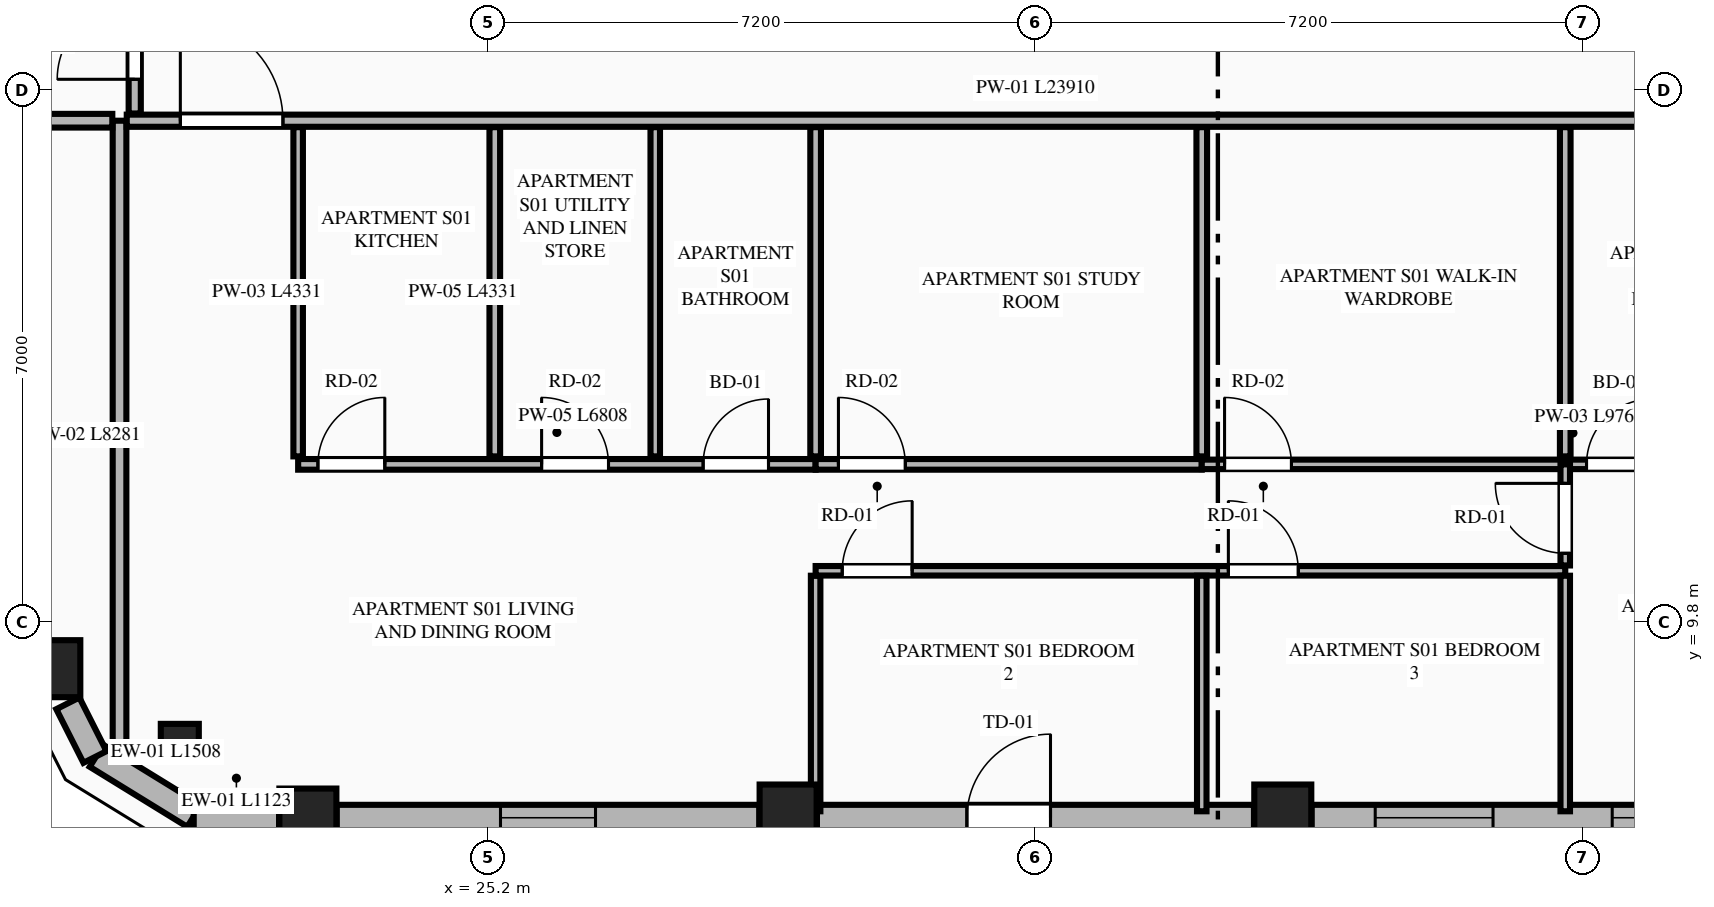
"""IFC4 building model, lengths in metres.
Left out: names, types, materials, properties, quantities, classifications, styles, units other than length and angle.
Written with IfcOpenShell. Run it as: python <this file> out.ifc"""

import sys

from ifc_helpers import new_model, si_unit, direction, frame, frame_2d, origin, origin_2d, place, context, subcontext, project, spatial, rectangle, extrude, element, fill, save


model = new_model("IFC4")
c1 = context("Model", 3, precision=1e-05, world=origin(), true_north=direction((0.0, 1.0)))
c2 = subcontext(c1, "Body", "Model", "MODEL_VIEW")
j1 = project(units=[si_unit("LENGTHUNIT", "METRE"), si_unit("PLANEANGLEUNIT", "RADIAN")], contexts=[c1])
p1 = place(None, origin())
s1 = spatial("IfcSite", under=j1, at=p1, CompositionType="ELEMENT")
p2 = place(p1, origin())
s2 = spatial("IfcBuilding", under=s1, at=p2, CompositionType="ELEMENT")
p3 = place(p2, frame((0.0, 0.0, 252.55)))
s3 = spatial("IfcBuildingStorey", under=s2, at=p3, CompositionType="ELEMENT", Elevation=252.55)
for number, where, z_axis, x_axis in (
    (1, (22.828, 7.239, 0.0), (0.0, 0.0, 1.0), (1.0, 0.0, 0.0)),
    (2, (29.146, 7.292, 0.0), (0.0, 0.0, 1.0), (1.0, 0.0, 0.0)),
    (3, (35.654, 7.292, 0.0), (0.0, 0.0, 1.0), (1.0, 0.0, 0.0)),
    (4, (19.459, 9.191, 0.0), (0.0, 0.0, 1.0), (1.0, 0.0, 0.0)),
):
    element("IfcColumn", number, at=place(p3, frame(where, z_axis=z_axis, x_axis=x_axis)), inside=s3, PredefinedType="COLUMN", context=c2, shape_type="SweptSolid", body=[
        extrude(rectangle(XDim=0.75, YDim=0.75, at=origin_2d()), origin(), (0.0, 0.0, 1.0), 3.65),
    ])
p4 = place(p3, frame((21.143, 8.215, 0.0), z_axis=(0.0, 0.0, 1.0), x_axis=(0.865256437757, -0.501329529272, 0.0)))
e5 = element("IfcColumn", 5, at=p4, inside=s3, PredefinedType="PILASTER", context=c2, shape_type="SweptSolid", body=[
    extrude(rectangle(XDim=0.5, YDim=0.35, at=origin_2d()), origin(), (0.0, 0.0, 1.0), 3.65),
])
p5 = place(p3, frame((20.047, 8.045, 0.0), z_axis=(0.0, 0.0, 1.0), x_axis=(0.851680557619, -0.52406128246, 0.0)))
e6 = element("IfcWall", 6, at=p5, inside=s3, PredefinedType="STANDARD", context=c2, shape_type="SweptSolid", body=[
    extrude(rectangle(XDim=1.508, YDim=0.34, at=frame_2d((0.754, 0.0))), origin(), (0.0, 0.0, 1.0), 3.45),
])
p6 = place(p3, frame((21.326, 7.23, 0.0), z_axis=(0.0, 0.0, 1.0), x_axis=(1.0, 0.0, 0.0)))
e7 = element("IfcWall", 7, at=p6, inside=s3, PredefinedType="STANDARD", context=c2, shape_type="SweptSolid", body=[
    extrude(rectangle(XDim=1.123, YDim=0.34, at=frame_2d((0.562, 0.0))), origin(), (0.0, 0.0, 1.0), 3.45),
])
p7 = place(p3, frame((23.207, 7.23, 0.0), z_axis=(0.0, 0.0, 1.0), x_axis=(1.0, 0.0, 0.0)))
e8 = element("IfcWall", 8, at=p7, inside=s3, PredefinedType="STANDARD", context=c2, shape_type="SweptSolid", body=[
    extrude(rectangle(XDim=5.56, YDim=0.34, at=frame_2d((2.78, 0.0))), origin(), (0.0, 0.0, 1.0), 2.983),
])
p8 = place(p7, frame((2.155, 0.0, 0.75)))
e9 = element("IfcOpeningElement", 9, at=p8, cuts=e8, PredefinedType="OPENING", context=c2, shape_type="SweptSolid", body=[
    extrude(rectangle(XDim=1.25, YDim=1.95, at=frame_2d((0.625, 0.975))), frame((0.0, 0.18, 0.0), z_axis=(0.0, -1.0, 0.0), x_axis=(1.0, 0.0, 0.0)), (0.0, 0.0, 1.0), 0.36),
])
p9 = place(p3, frame((29.525, 7.23, 0.0), z_axis=(0.0, 0.0, 1.0), x_axis=(1.0, 0.0, 0.0)))
e10 = element("IfcWall", 10, at=p9, inside=s3, PredefinedType="STANDARD", context=c2, shape_type="SweptSolid", body=[
    extrude(rectangle(XDim=5.75, YDim=0.34, at=frame_2d((2.875, 0.0))), origin(), (0.0, 0.0, 1.0), 2.983),
])
p10 = place(p9, frame((1.973, 0.0, 0.0)))
e11 = element("IfcOpeningElement", 11, at=p10, cuts=e10, PredefinedType="OPENING", context=c2, shape_type="SweptSolid", body=[
    extrude(rectangle(XDim=1.1, YDim=2.25, at=frame_2d((0.55, 1.125))), frame((0.0, 0.18, 0.0), z_axis=(0.0, -1.0, 0.0), x_axis=(1.0, 0.0, 0.0)), (0.0, 0.0, 1.0), 0.36),
])
p11 = place(p3, frame((36.033, 7.23, 0.0), z_axis=(0.0, 0.0, 1.0), x_axis=(1.0, 0.0, 0.0)))
e12 = element("IfcWall", 12, at=p11, inside=s3, PredefinedType="STANDARD", context=c2, shape_type="SweptSolid", body=[
    extrude(rectangle(XDim=5.56, YDim=0.34, at=frame_2d((2.78, 0.0))), origin(), (0.0, 0.0, 1.0), 2.983),
])
p12 = place(p11, frame((0.837, 0.0, 0.75)))
e13 = element("IfcOpeningElement", 13, at=p12, cuts=e12, PredefinedType="OPENING", context=c2, shape_type="SweptSolid", body=[
    extrude(rectangle(XDim=1.55, YDim=2.05, at=frame_2d((0.775, 1.025))), frame((0.0, 0.18, 0.0), z_axis=(0.0, -1.0, 0.0), x_axis=(1.0, 0.0, 0.0)), (0.0, 0.0, 1.0), 0.36),
])
p13 = place(p11, frame((3.955, 0.0, 0.75)))
e14 = element("IfcOpeningElement", 14, at=p13, cuts=e12, PredefinedType="OPENING", context=c2, shape_type="SweptSolid", body=[
    extrude(rectangle(XDim=1.1, YDim=2.0, at=frame_2d((0.55, 1.0))), frame((0.0, 0.18, 0.0), z_axis=(0.0, -1.0, 0.0), x_axis=(1.0, 0.0, 0.0)), (0.0, 0.0, 1.0), 0.36),
])
p14 = place(p3, frame((19.67, 8.735, 0.0), z_axis=(0.0, 0.0, 1.0), x_axis=(0.451404919072, -0.89231922485, 0.0)))
e15 = element("IfcWall", 15, at=p14, inside=s3, PredefinedType="STANDARD", context=c2, shape_type="SweptSolid", body=[
    extrude(rectangle(XDim=0.791, YDim=0.34, at=frame_2d((0.396, 0.0))), origin(), (0.0, 0.0, 1.0), 3.45),
])
p15 = place(p3, frame((20.35, 8.119, 0.0), z_axis=(0.0, 0.0, 1.0), x_axis=(0.0, 1.0, 0.0)))
e16 = element("IfcWall", 16, at=p15, inside=s3, PredefinedType="PARTITIONING", context=c2, shape_type="SweptSolid", body=[
    extrude(rectangle(XDim=8.281, YDim=0.18, at=frame_2d((4.141, 0.0))), origin(), (0.0, 0.0, 1.0), 3.45),
])
p16 = place(p3, frame((20.445, 16.4, 0.0), z_axis=(0.0, 0.0, 1.0), x_axis=(1.0, 0.0, 0.0)))
e17 = element("IfcWall", 17, at=p16, inside=s3, PredefinedType="PARTITIONING", context=c2, shape_type="SweptSolid", body=[
    extrude(rectangle(XDim=23.91, YDim=0.16, at=frame_2d((11.955, 0.0))), origin(), (0.0, 0.0, 1.0), 3.45),
])
p17 = place(p16, frame((0.705, 0.0, 0.0)))
e18 = element("IfcOpeningElement", 18, at=p17, cuts=e17, PredefinedType="OPENING", context=c2, shape_type="SweptSolid", body=[
    extrude(rectangle(XDim=1.35, YDim=2.35, at=frame_2d((0.675, 1.175))), frame((0.0, 0.09, 0.0), z_axis=(0.0, -1.0, 0.0), x_axis=(1.0, 0.0, 0.0)), (0.0, 0.0, 1.0), 0.18),
])
p18 = place(p3, frame((22.7, 11.984, 0.0), z_axis=(0.0, 0.0, 1.0), x_axis=(0.0, 1.0, 0.0)))
e19 = element("IfcWall", 19, at=p18, inside=s3, PredefinedType="PARTITIONING", context=c2, shape_type="SweptSolid", body=[
    extrude(rectangle(XDim=4.331, YDim=0.125, at=frame_2d((2.166, 0.0))), origin(), (0.0, 0.0, 1.0), 2.907),
])
p19 = place(p3, frame((22.7, 11.879, 0.0), z_axis=(0.0, 0.0, 1.0), x_axis=(1.0, 0.0, 0.0)))
e20 = element("IfcWall", 20, at=p19, inside=s3, PredefinedType="PLUMBINGWALL", context=c2, shape_type="SweptSolid", body=[
    extrude(rectangle(XDim=6.808, YDim=0.14, at=frame_2d((3.404, 0.0))), origin(), (0.0, 0.0, 1.0), 3.45),
])
p20 = place(p19, frame((5.328, 0.0, 0.0)))
e21 = element("IfcOpeningElement", 21, at=p20, cuts=e20, PredefinedType="OPENING", context=c2, shape_type="SweptSolid", body=[
    extrude(rectangle(XDim=0.86, YDim=2.1, at=frame_2d((0.43, 1.05))), frame((0.0, 0.08, 0.0), z_axis=(0.0, -1.0, 0.0), x_axis=(1.0, 0.0, 0.0)), (0.0, 0.0, 1.0), 0.16),
])
p21 = place(p19, frame((0.26, 0.0, 0.0)))
e22 = element("IfcOpeningElement", 22, at=p21, cuts=e20, PredefinedType="OPENING", context=c2, shape_type="SweptSolid", body=[
    extrude(rectangle(XDim=0.88, YDim=2.15, at=frame_2d((0.44, 1.075))), frame((0.0, 0.08, 0.0), z_axis=(0.0, -1.0, 0.0), x_axis=(1.0, 0.0, 0.0)), (0.0, 0.0, 1.0), 0.16),
])
p22 = place(p19, frame((3.203, 0.0, 0.0)))
e23 = element("IfcOpeningElement", 23, at=p22, cuts=e20, PredefinedType="OPENING", context=c2, shape_type="SweptSolid", body=[
    extrude(rectangle(XDim=0.88, YDim=2.15, at=frame_2d((0.44, 1.075))), frame((0.0, 0.08, 0.0), z_axis=(0.0, -1.0, 0.0), x_axis=(1.0, 0.0, 0.0)), (0.0, 0.0, 1.0), 0.16),
])
p23 = place(p3, frame((29.508, 11.879, 0.0), z_axis=(0.0, 0.0, 1.0), x_axis=(1.0, 0.0, 0.0)))
e24 = element("IfcWall", 24, at=p23, inside=s3, PredefinedType="PLUMBINGWALL", context=c2, shape_type="SweptSolid", body=[
    extrude(rectangle(XDim=5.08, YDim=0.14, at=frame_2d((2.54, 0.0))), origin(), (0.0, 0.0, 1.0), 3.45),
])
p24 = place(p23, frame((0.3, 0.0, 0.0)))
e25 = element("IfcOpeningElement", 25, at=p24, cuts=e24, PredefinedType="OPENING", context=c2, shape_type="SweptSolid", body=[
    extrude(rectangle(XDim=0.88, YDim=2.15, at=frame_2d((0.44, 1.075))), frame((0.0, 0.08, 0.0), z_axis=(0.0, -1.0, 0.0), x_axis=(1.0, 0.0, 0.0)), (0.0, 0.0, 1.0), 0.16),
])
p25 = place(p3, frame((34.588, 11.879, 0.0), z_axis=(0.0, 0.0, 1.0), x_axis=(1.0, 0.0, 0.0)))
e26 = element("IfcWall", 26, at=p25, inside=s3, PredefinedType="PARTITIONING", context=c2, shape_type="SweptSolid", body=[
    extrude(rectangle(XDim=9.767, YDim=0.125, at=frame_2d((4.884, 0.0))), origin(), (0.0, 0.0, 1.0), 3.45),
])
p26 = place(p25, frame((5.062, 0.0, 0.0)))
e27 = element("IfcOpeningElement", 27, at=p26, cuts=e26, PredefinedType="OPENING", context=c2, shape_type="SweptSolid", body=[
    extrude(rectangle(XDim=0.86, YDim=2.1, at=frame_2d((0.43, 1.05))), frame((0.0, 0.073, 0.0), z_axis=(0.0, -1.0, 0.0), x_axis=(1.0, 0.0, 0.0)), (0.0, 0.0, 1.0), 0.145),
])
p27 = place(p25, frame((8.226, 0.0, 0.0)))
e28 = element("IfcOpeningElement", 28, at=p27, cuts=e26, PredefinedType="OPENING", context=c2, shape_type="SweptSolid", body=[
    extrude(rectangle(XDim=0.88, YDim=2.15, at=frame_2d((0.44, 1.075))), frame((0.0, 0.073, 0.0), z_axis=(0.0, -1.0, 0.0), x_axis=(1.0, 0.0, 0.0)), (0.0, 0.0, 1.0), 0.145),
])
p28 = place(p25, frame((0.3, 0.0, 0.0)))
e29 = element("IfcOpeningElement", 29, at=p28, cuts=e26, PredefinedType="OPENING", context=c2, shape_type="SweptSolid", body=[
    extrude(rectangle(XDim=0.88, YDim=2.15, at=frame_2d((0.44, 1.075))), frame((0.0, 0.073, 0.0), z_axis=(0.0, -1.0, 0.0), x_axis=(1.0, 0.0, 0.0)), (0.0, 0.0, 1.0), 0.145),
])
p29 = place(p3, frame((25.287, 11.984, 0.0), z_axis=(0.0, 0.0, 1.0), x_axis=(0.0, 1.0, 0.0)))
e30 = element("IfcWall", 30, at=p29, inside=s3, PredefinedType="PLUMBINGWALL", context=c2, shape_type="SweptSolid", body=[
    extrude(rectangle(XDim=4.331, YDim=0.14, at=frame_2d((2.166, 0.0))), origin(), (0.0, 0.0, 1.0), 3.45),
])
p30 = place(p3, frame((27.398, 11.984, 0.0), z_axis=(0.0, 0.0, 1.0), x_axis=(0.0, 1.0, 0.0)))
e31 = element("IfcWall", 31, at=p30, inside=s3, PredefinedType="PARTITIONING", context=c2, shape_type="SweptSolid", body=[
    extrude(rectangle(XDim=4.331, YDim=0.125, at=frame_2d((2.166, 0.0))), origin(), (0.0, 0.0, 1.0), 3.45),
])
p31 = place(p3, frame((29.508, 7.315, 0.0), z_axis=(0.0, 0.0, 1.0), x_axis=(0.0, 1.0, 0.0)))
e32 = element("IfcWall", 32, at=p31, inside=s3, PredefinedType="PARTITIONING", context=c2, shape_type="SweptSolid", body=[
    extrude(rectangle(XDim=3.099, YDim=0.125, at=frame_2d((1.55, 0.0))), origin(), (0.0, 0.0, 1.0), 3.45),
])
p32 = place(p3, frame((29.508, 10.479, 0.0), z_axis=(0.0, 0.0, 1.0), x_axis=(1.0, 0.0, 0.0)))
e33 = element("IfcWall", 33, at=p32, inside=s3, PredefinedType="PARTITIONING", context=c2, shape_type="SweptSolid", body=[
    extrude(rectangle(XDim=9.862, YDim=0.125, at=frame_2d((4.931, 0.0))), origin(), (0.0, 0.0, 1.0), 3.45),
])
p33 = place(p32, frame((0.35, 0.0, 0.0)))
e34 = element("IfcOpeningElement", 34, at=p33, cuts=e33, PredefinedType="OPENING", context=c2, shape_type="SweptSolid", body=[
    extrude(rectangle(XDim=0.92, YDim=2.15, at=frame_2d((0.46, 1.075))), frame((0.0, 0.073, 0.0), z_axis=(0.0, -1.0, 0.0), x_axis=(1.0, 0.0, 0.0)), (0.0, 0.0, 1.0), 0.145),
])
p34 = place(p32, frame((5.43, 0.0, 0.0)))
e35 = element("IfcOpeningElement", 35, at=p34, cuts=e33, PredefinedType="OPENING", context=c2, shape_type="SweptSolid", body=[
    extrude(rectangle(XDim=0.92, YDim=2.15, at=frame_2d((0.46, 1.075))), frame((0.0, 0.073, 0.0), z_axis=(0.0, -1.0, 0.0), x_axis=(1.0, 0.0, 0.0)), (0.0, 0.0, 1.0), 0.145),
])
p35 = place(p3, frame((39.37, 10.549, 0.0), z_axis=(0.0, 0.0, 1.0), x_axis=(0.0, 1.0, 0.0)))
e36 = element("IfcWall", 36, at=p35, inside=s3, PredefinedType="PARTITIONING", context=c2, shape_type="SweptSolid", body=[
    extrude(rectangle(XDim=1.33, YDim=0.125, at=frame_2d((0.665, 0.0))), origin(), (0.0, 0.0, 1.0), 3.45),
])
p36 = place(p35, frame((0.16, 0.0, 0.0)))
e37 = element("IfcOpeningElement", 37, at=p36, cuts=e36, PredefinedType="OPENING", context=c2, shape_type="SweptSolid", body=[
    extrude(rectangle(XDim=0.92, YDim=2.15, at=frame_2d((0.46, 1.075))), frame((0.0, 0.073, 0.0), z_axis=(0.0, -1.0, 0.0), x_axis=(1.0, 0.0, 0.0)), (0.0, 0.0, 1.0), 0.145),
])
for number, where, z_axis, x_axis in (
    (38, (29.508, 11.984, 0.0), (0.0, 0.0, 1.0), (0.0, 1.0, 0.0)),
    (39, (34.588, 11.984, 0.0), (0.0, 0.0, 1.0), (0.0, 1.0, 0.0)),
):
    element("IfcWall", number, at=place(p3, frame(where, z_axis=z_axis, x_axis=x_axis)), inside=s3, PredefinedType="PLUMBINGWALL", context=c2, shape_type="SweptSolid", body=[
        extrude(rectangle(XDim=4.331, YDim=0.14, at=frame_2d((2.166, 0.0))), origin(), (0.0, 0.0, 1.0), 3.45),
    ])
for number, where, z_axis, x_axis in (
    (40, (34.588, 7.315, 0.0), (0.0, 0.0, 1.0), (0.0, 1.0, 0.0)),
    (41, (39.37, 7.315, 0.0), (0.0, 0.0, 1.0), (0.0, 1.0, 0.0)),
):
    element("IfcWall", number, at=place(p3, frame(where, z_axis=z_axis, x_axis=x_axis)), inside=s3, PredefinedType="PARTITIONING", context=c2, shape_type="SweptSolid", body=[
        extrude(rectangle(XDim=3.099, YDim=0.125, at=frame_2d((1.55, 0.0))), origin(), (0.0, 0.0, 1.0), 3.45),
    ])
p37 = place(p3, frame((39.37, 11.984, 0.0), z_axis=(0.0, 0.0, 1.0), x_axis=(0.0, 1.0, 0.0)))
e42 = element("IfcWall", 42, at=p37, inside=s3, PredefinedType="PLUMBINGWALL", context=c2, shape_type="SweptSolid", body=[
    extrude(rectangle(XDim=4.331, YDim=0.14, at=frame_2d((2.166, 0.0))), origin(), (0.0, 0.0, 1.0), 3.45),
])
p38 = place(p3, frame((16.034, 16.4, 0.0), z_axis=(0.0, 0.0, 1.0), x_axis=(1.0, 0.0, 0.0)))
e43 = element("IfcWall", 43, at=p38, inside=s3, PredefinedType="PARTITIONING", context=c2, shape_type="SweptSolid", body=[
    extrude(rectangle(XDim=4.221, YDim=0.18, at=frame_2d((2.11, 0.0))), origin(), (0.0, 0.0, 1.0), 3.45),
])
p39 = place(p3, frame((20.55, 16.495, 0.0), z_axis=(0.0, 0.0, 1.0), x_axis=(0.0, 1.0, 0.0)))
e44 = element("IfcWall", 44, at=p39, inside=s3, PredefinedType="PARTITIONING", context=c2, shape_type="SweptSolid", body=[
    extrude(rectangle(XDim=18.41, YDim=0.16, at=frame_2d((9.205, 0.0))), origin(), (0.0, 0.0, 1.0), 3.137),
])
p40 = place(p39, frame((0.45, 0.0, 0.0)))
e45 = element("IfcOpeningElement", 45, at=p40, cuts=e44, PredefinedType="OPENING", context=c2, shape_type="SweptSolid", body=[
    extrude(rectangle(XDim=1.02, YDim=2.25, at=frame_2d((0.51, 1.125))), frame((0.0, 0.09, 0.0), z_axis=(0.0, -1.0, 0.0), x_axis=(1.0, 0.0, 0.0)), (0.0, 0.0, 1.0), 0.18),
])
p41 = place(p8, origin())
e46 = element("IfcWindow", 46, at=p41, inside=s3, PartitioningType="SINGLE_PANEL", PredefinedType="WINDOW", context=c2, shape_type="SweptSolid", body=[
    extrude(rectangle(XDim=1.25, YDim=1.95, at=frame_2d((0.625, 0.975))), frame((0.0, 0.03, 0.0), z_axis=(0.0, -1.0, 0.0), x_axis=(1.0, 0.0, 0.0)), (0.0, 0.0, 1.0), 0.06),
])
fill(e9, e46)
p42 = place(p10, origin())
e47 = element("IfcDoor", 47, at=p42, inside=s3, OperationType="SINGLE_SWING_RIGHT", PredefinedType="DOOR", context=c2, shape_type="SweptSolid", body=[
    extrude(rectangle(XDim=1.1, YDim=2.25, at=frame_2d((0.55, 1.125))), frame((0.0, 0.025, 0.0), z_axis=(0.0, -1.0, 0.0), x_axis=(1.0, 0.0, 0.0)), (0.0, 0.0, 1.0), 0.05),
])
fill(e11, e47)
p43 = place(p12, origin())
e48 = element("IfcWindow", 48, at=p43, inside=s3, PartitioningType="SINGLE_PANEL", PredefinedType="WINDOW", context=c2, shape_type="SweptSolid", body=[
    extrude(rectangle(XDim=1.55, YDim=2.05, at=frame_2d((0.775, 1.025))), frame((0.0, 0.03, 0.0), z_axis=(0.0, -1.0, 0.0), x_axis=(1.0, 0.0, 0.0)), (0.0, 0.0, 1.0), 0.06),
])
fill(e13, e48)
p44 = place(p20, origin())
e49 = element("IfcDoor", 49, at=p44, inside=s3, OperationType="SINGLE_SWING_RIGHT", PredefinedType="DOOR", context=c2, shape_type="SweptSolid", body=[
    extrude(rectangle(XDim=0.86, YDim=2.1, at=frame_2d((0.43, 1.05))), frame((0.0, 0.025, 0.0), z_axis=(0.0, -1.0, 0.0), x_axis=(1.0, 0.0, 0.0)), (0.0, 0.0, 1.0), 0.05),
])
fill(e21, e49)
p45 = place(p26, origin())
e50 = element("IfcDoor", 50, at=p45, inside=s3, OperationType="SINGLE_SWING_RIGHT", PredefinedType="DOOR", context=c2, shape_type="SweptSolid", body=[
    extrude(rectangle(XDim=0.86, YDim=2.1, at=frame_2d((0.43, 1.05))), frame((0.0, 0.025, 0.0), z_axis=(0.0, -1.0, 0.0), x_axis=(1.0, 0.0, 0.0)), (0.0, 0.0, 1.0), 0.05),
])
fill(e27, e50)
p46 = place(p17, origin())
e51 = element("IfcDoor", 51, at=p46, inside=s3, OperationType="SINGLE_SWING_LEFT", PredefinedType="DOOR", context=c2, shape_type="SweptSolid", body=[
    extrude(rectangle(XDim=1.35, YDim=2.35, at=frame_2d((0.675, 1.175))), frame((0.0, 0.025, 0.0), z_axis=(0.0, -1.0, 0.0), x_axis=(1.0, 0.0, 0.0)), (0.0, 0.0, 1.0), 0.05),
])
fill(e18, e51)
p47 = place(p21, origin())
e52 = element("IfcDoor", 52, at=p47, inside=s3, OperationType="SINGLE_SWING_RIGHT", PredefinedType="DOOR", context=c2, shape_type="SweptSolid", body=[
    extrude(rectangle(XDim=0.88, YDim=2.15, at=frame_2d((0.44, 1.075))), frame((0.0, 0.025, 0.0), z_axis=(0.0, -1.0, 0.0), x_axis=(1.0, 0.0, 0.0)), (0.0, 0.0, 1.0), 0.05),
])
fill(e22, e52)
p48 = place(p22, origin())
e53 = element("IfcDoor", 53, at=p48, inside=s3, OperationType="SINGLE_SWING_LEFT", PredefinedType="DOOR", context=c2, shape_type="SweptSolid", body=[
    extrude(rectangle(XDim=0.88, YDim=2.15, at=frame_2d((0.44, 1.075))), frame((0.0, 0.025, 0.0), z_axis=(0.0, -1.0, 0.0), x_axis=(1.0, 0.0, 0.0)), (0.0, 0.0, 1.0), 0.05),
])
fill(e23, e53)
p49 = place(p24, origin())
e54 = element("IfcDoor", 54, at=p49, inside=s3, OperationType="SINGLE_SWING_LEFT", PredefinedType="DOOR", context=c2, shape_type="SweptSolid", body=[
    extrude(rectangle(XDim=0.88, YDim=2.15, at=frame_2d((0.44, 1.075))), frame((0.0, 0.025, 0.0), z_axis=(0.0, -1.0, 0.0), x_axis=(1.0, 0.0, 0.0)), (0.0, 0.0, 1.0), 0.05),
])
fill(e25, e54)
p50 = place(p33, origin())
e55 = element("IfcDoor", 55, at=p50, inside=s3, OperationType="SINGLE_SWING_RIGHT", PredefinedType="DOOR", context=c2, shape_type="SweptSolid", body=[
    extrude(rectangle(XDim=0.92, YDim=2.15, at=frame_2d((0.46, 1.075))), frame((0.0, 0.025, 0.0), z_axis=(0.0, -1.0, 0.0), x_axis=(1.0, 0.0, 0.0)), (0.0, 0.0, 1.0), 0.05),
])
fill(e34, e55)
p51 = place(p34, origin())
e56 = element("IfcDoor", 56, at=p51, inside=s3, OperationType="SINGLE_SWING_LEFT", PredefinedType="DOOR", context=c2, shape_type="SweptSolid", body=[
    extrude(rectangle(XDim=0.92, YDim=2.15, at=frame_2d((0.46, 1.075))), frame((0.0, 0.025, 0.0), z_axis=(0.0, -1.0, 0.0), x_axis=(1.0, 0.0, 0.0)), (0.0, 0.0, 1.0), 0.05),
])
fill(e35, e56)
p52 = place(p36, origin())
e57 = element("IfcDoor", 57, at=p52, inside=s3, OperationType="SINGLE_SWING_RIGHT", PredefinedType="DOOR", context=c2, shape_type="SweptSolid", body=[
    extrude(rectangle(XDim=0.92, YDim=2.15, at=frame_2d((0.46, 1.075))), frame((0.0, 0.025, 0.0), z_axis=(0.0, -1.0, 0.0), x_axis=(1.0, 0.0, 0.0)), (0.0, 0.0, 1.0), 0.05),
])
fill(e37, e57)
p53 = place(p28, origin())
e58 = element("IfcDoor", 58, at=p53, inside=s3, OperationType="SINGLE_SWING_LEFT", PredefinedType="DOOR", context=c2, shape_type="SweptSolid", body=[
    extrude(rectangle(XDim=0.88, YDim=2.15, at=frame_2d((0.44, 1.075))), frame((0.0, 0.025, 0.0), z_axis=(0.0, -1.0, 0.0), x_axis=(1.0, 0.0, 0.0)), (0.0, 0.0, 1.0), 0.05),
])
fill(e29, e58)
p54 = place(p40, origin())
e59 = element("IfcDoor", 59, at=p54, inside=s3, OperationType="SINGLE_SWING_LEFT", PredefinedType="DOOR", context=c2, shape_type="SweptSolid", body=[
    extrude(rectangle(XDim=1.02, YDim=2.25, at=frame_2d((0.51, 1.125))), frame((0.0, 0.025, 0.0), z_axis=(0.0, -1.0, 0.0), x_axis=(1.0, 0.0, 0.0)), (0.0, 0.0, 1.0), 0.05),
])
fill(e45, e59)
p55 = place(p13, origin())
e60 = element("IfcWindow", 60, at=p55, inside=s3, PartitioningType="SINGLE_PANEL", PredefinedType="WINDOW", context=c2, shape_type="SweptSolid", body=[
    extrude(rectangle(XDim=1.1, YDim=2.0, at=frame_2d((0.55, 1.0))), frame((0.0, 0.03, 0.0), z_axis=(0.0, -1.0, 0.0), x_axis=(1.0, 0.0, 0.0)), (0.0, 0.0, 1.0), 0.06),
])
fill(e14, e60)
save(model, sys.argv[1])
